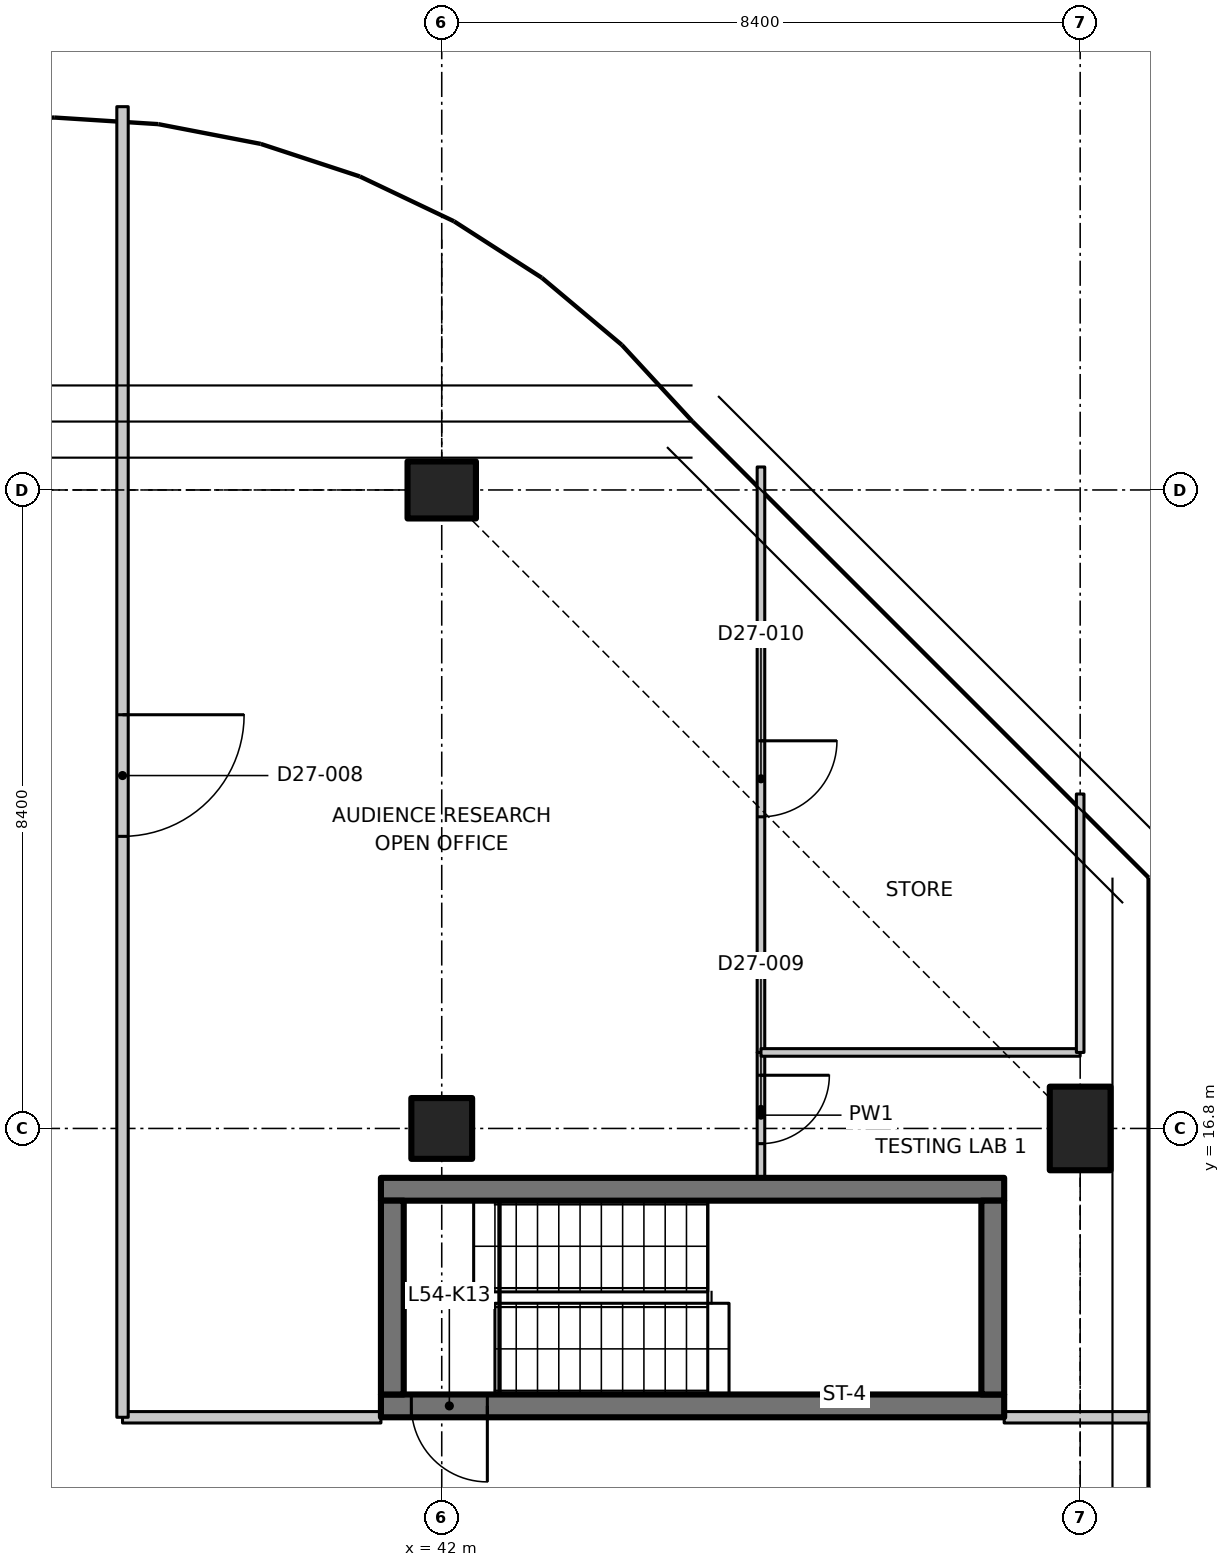
"""IFC4 building model, lengths in metres.
Left out: names, types, materials, properties, quantities, classifications, styles, units other than length and angle.
Written with IfcOpenShell. Run it as: python <this file> out.ifc"""

import sys

from ifc_helpers import new_model, si_unit, direction, frame, frame_2d, origin, origin_2d, place, context, subcontext, project, spatial, polyline, rectangle, outline, extrude, element, fill, save


model = new_model("IFC4")
c1 = context("Model", 3, precision=1e-05, world=origin(), true_north=direction((0.0, 1.0)))
c2 = subcontext(c1, "Body", "Model", "MODEL_VIEW")
j1 = project(units=[si_unit("LENGTHUNIT", "METRE"), si_unit("PLANEANGLEUNIT", "RADIAN")], contexts=[c1])
p1 = place(None, origin())
s1 = spatial("IfcSite", under=j1, at=p1, CompositionType="ELEMENT")
p2 = place(p1, origin())
s2 = spatial("IfcBuilding", under=s1, at=p2, CompositionType="ELEMENT")
p3 = place(p2, frame((0.0, 0.0, 215.7)))
s3 = spatial("IfcBuildingStorey", under=s2, at=p3, CompositionType="ELEMENT", Elevation=215.7)
p4 = place(p3, frame((42.0, 16.8, 0.0), z_axis=(0.0, 0.0, 1.0), x_axis=(1.0, 0.0, 0.0)))
e1 = element("IfcColumn", 1, at=p4, inside=s3, PredefinedType="COLUMN", context=c2, shape_type="SweptSolid", body=[
    extrude(rectangle(XDim=0.8, YDim=0.8, at=origin_2d()), origin(), (0.0, 0.0, 1.0), 3.35),
])
p5 = place(p3, frame((42.0, 25.2, 0.0), z_axis=(0.0, 0.0, 1.0), x_axis=(0.0, 1.0, 0.0)))
e2 = element("IfcColumn", 2, at=p5, inside=s3, PredefinedType="COLUMN", context=c2, shape_type="SweptSolid", body=[
    extrude(rectangle(XDim=0.75, YDim=0.9, at=origin_2d()), origin(), (0.0, 0.0, 1.0), 3.35),
])
p6 = place(p3, frame((50.4, 16.8, 0.0), z_axis=(0.0, 0.0, 1.0), x_axis=(1.0, 0.0, 0.0)))
e3 = element("IfcColumn", 3, at=p6, inside=s3, PredefinedType="COLUMN", context=c2, shape_type="SweptSolid", body=[
    extrude(rectangle(XDim=0.8, YDim=1.1, at=origin_2d()), origin(), (0.0, 0.0, 1.0), 3.35),
])
p7 = place(p3, frame((49.4, 13.15, 0.0), z_axis=(0.0, 0.0, 1.0), x_axis=(-1.0, 0.0, 0.0)))
e4 = element("IfcWall", 4, at=p7, inside=s3, PredefinedType="SHEAR", context=c2, shape_type="SweptSolid", body=[
    extrude(rectangle(XDim=8.2, YDim=0.3, at=frame_2d((4.1, 0.0))), origin(), (0.0, 0.0, 1.0), 3.35),
])
p8 = place(p7, frame((6.8, 0.0, 0.0)))
e5 = element("IfcOpeningElement", 5, at=p8, cuts=e4, PredefinedType="OPENING", context=c2, shape_type="SweptSolid", body=[
    extrude(rectangle(XDim=1.0, YDim=2.1, at=frame_2d((0.5, 1.05))), frame((0.0, 0.16, 0.0), z_axis=(0.0, -1.0, 0.0), x_axis=(1.0, 0.0, 0.0)), (0.0, 0.0, 1.0), 0.32),
])
p9 = place(p3, frame((41.2, 16.0, 0.0), z_axis=(0.0, 0.0, 1.0), x_axis=(1.0, 0.0, 0.0)))
e6 = element("IfcWall", 6, at=p9, inside=s3, PredefinedType="SHEAR", context=c2, shape_type="SweptSolid", body=[
    extrude(rectangle(XDim=8.2, YDim=0.3, at=frame_2d((4.1, 0.0))), origin(), (0.0, 0.0, 1.0), 3.35),
])
for number, where, z_axis, x_axis in (
    (7, (41.35, 13.3, 0.0), (0.0, 0.0, 1.0), (0.0, 1.0, 0.0)),
    (8, (49.25, 13.3, 0.0), (0.0, 0.0, 1.0), (0.0, 1.0, 0.0)),
):
    element("IfcWall", number, at=place(p3, frame(where, z_axis=z_axis, x_axis=x_axis)), inside=s3, PredefinedType="SHEAR", context=c2, shape_type="SweptSolid", body=[
        extrude(rectangle(XDim=2.55, YDim=0.3, at=frame_2d((1.275, 0.0))), origin(), (0.0, 0.0, 1.0), 3.35),
    ])
p10 = place(p3, frame((37.8, 13.0, 0.0), z_axis=(0.0, 0.0, 1.0), x_axis=(1.0, 0.0, 0.0)))
e9 = element("IfcWall", 9, at=p10, inside=s3, PredefinedType="PARTITIONING", context=c2, shape_type="SweptSolid", body=[
    extrude(rectangle(XDim=3.4, YDim=0.15, at=frame_2d((1.7, 0.0))), origin(), (0.0, 0.0, 1.0), 3.33),
])
p11 = place(p3, frame((49.4, 13.0, 0.0), z_axis=(0.0, 0.0, 1.0), x_axis=(1.0, 0.0, 0.0)))
e10 = element("IfcWall", 10, at=p11, inside=s3, PredefinedType="PARTITIONING", context=c2, shape_type="SweptSolid", body=[
    extrude(rectangle(XDim=2.42, YDim=0.15, at=frame_2d((1.21, 0.0))), origin(), (0.0, 0.0, 1.0), 2.98),
])
p12 = place(p3, frame((37.8, 30.243, 0.0), z_axis=(0.0, 0.0, 1.0), x_axis=(0.0, -1.0, 0.0)))
e11 = element("IfcWall", 11, at=p12, inside=s3, PredefinedType="PARTITIONING", context=c2, shape_type="SweptSolid", body=[
    extrude(outline(polyline([(0.0, 0.0), (17.243, 0.0), (17.243, 3.33), (5.493, 3.33), (5.491, 2.98), (4.595, 2.98), (4.593, 3.33), (0.0, 3.33), (0.0, 0.0)])), frame((0.0, 0.075, 0.0), z_axis=(0.0, -1.0, 0.0), x_axis=(1.0, 0.0, 0.0)), (0.0, 0.0, 1.0), 0.15),
])
p13 = place(p12, frame((8.0, 0.0, 0.0)))
e12 = element("IfcOpeningElement", 12, at=p13, cuts=e11, PredefinedType="OPENING", context=c2, shape_type="SweptSolid", body=[
    extrude(rectangle(XDim=1.6, YDim=2.1, at=frame_2d((0.8, 1.05))), frame((0.0, 0.085, 0.0), z_axis=(0.0, -1.0, 0.0), x_axis=(1.0, 0.0, 0.0)), (0.0, 0.0, 1.0), 0.17),
])
p14 = place(p3, frame((46.2, 17.8, 0.0), z_axis=(0.0, 0.0, 1.0), x_axis=(0.0, -1.0, 0.0)))
e13 = element("IfcWall", 13, at=p14, inside=s3, PredefinedType="PARTITIONING", context=c2, shape_type="SweptSolid", body=[
    extrude(rectangle(XDim=1.65, YDim=0.1, at=frame_2d((0.825, 0.0))), origin(), (0.0, 0.0, 1.0), 3.33),
])
p15 = place(p14, frame((0.3, 0.0, 0.0)))
e14 = element("IfcOpeningElement", 14, at=p15, cuts=e13, PredefinedType="OPENING", context=c2, shape_type="SweptSolid", body=[
    extrude(rectangle(XDim=0.9, YDim=2.1, at=frame_2d((0.45, 1.05))), frame((0.0, 0.06, 0.0), z_axis=(0.0, -1.0, 0.0), x_axis=(1.0, 0.0, 0.0)), (0.0, 0.0, 1.0), 0.12),
])
p16 = place(p3, frame((46.2, 25.502, 0.0), z_axis=(0.0, 0.0, 1.0), x_axis=(0.0, -1.0, 0.0)))
e15 = element("IfcWall", 15, at=p16, inside=s3, PredefinedType="PARTITIONING", context=c2, shape_type="SweptSolid", body=[
    extrude(outline(polyline([(0.0, 0.0), (7.702, 0.0), (7.702, 3.33), (5.168, 3.33), (5.166, 2.98), (3.839, 2.98), (3.837, 3.33), (0.103, 3.33), (0.0, 3.33), (0.0, 0.0)])), frame((0.0, 0.05, 0.0), z_axis=(0.0, -1.0, 0.0), x_axis=(1.0, 0.0, 0.0)), (0.0, 0.0, 1.0), 0.1),
])
p17 = place(p16, frame((3.603, 0.0, 0.0)))
e16 = element("IfcOpeningElement", 16, at=p17, cuts=e15, PredefinedType="OPENING", context=c2, shape_type="SweptSolid", body=[
    extrude(rectangle(XDim=1.0, YDim=2.1, at=frame_2d((0.5, 1.05))), frame((0.0, 0.06, 0.0), z_axis=(0.0, -1.0, 0.0), x_axis=(1.0, 0.0, 0.0)), (0.0, 0.0, 1.0), 0.12),
])
p18 = place(p3, frame((46.2, 17.8, 0.0), z_axis=(0.0, 0.0, 1.0), x_axis=(1.0, 0.0, 0.0)))
e17 = element("IfcWall", 17, at=p18, inside=s3, PredefinedType="PARTITIONING", context=c2, shape_type="SweptSolid", body=[
    extrude(rectangle(XDim=4.2, YDim=0.1, at=frame_2d((2.1, 0.0))), origin(), (0.0, 0.0, 1.0), 2.98),
])
p19 = place(p3, frame((50.4, 17.8, 0.0), z_axis=(0.0, 0.0, 1.0), x_axis=(0.0, 1.0, 0.0)))
e18 = element("IfcWall", 18, at=p19, inside=s3, PredefinedType="PARTITIONING", context=c2, shape_type="SweptSolid", body=[
    extrude(rectangle(XDim=3.4, YDim=0.1, at=frame_2d((1.7, 0.0))), origin(), (0.0, 0.0, 1.0), 3.33),
])
p20 = place(p8, origin())
e19 = element("IfcDoor", 19, at=p20, inside=s3, OperationType="SINGLE_SWING_RIGHT", PredefinedType="DOOR", context=c2, shape_type="SweptSolid", body=[
    extrude(rectangle(XDim=1.0, YDim=2.1, at=frame_2d((0.5, 1.05))), frame((0.0, 0.025, 0.0), z_axis=(0.0, -1.0, 0.0), x_axis=(1.0, 0.0, 0.0)), (0.0, 0.0, 1.0), 0.05),
])
fill(e5, e19)
p21 = place(p13, origin())
e20 = element("IfcDoor", 20, at=p21, inside=s3, OperationType="DOUBLE_DOOR_SINGLE_SWING", PredefinedType="DOOR", context=c2, shape_type="SweptSolid", body=[
    extrude(rectangle(XDim=1.6, YDim=2.1, at=frame_2d((0.8, 1.05))), frame((0.0, 0.025, 0.0), z_axis=(0.0, -1.0, 0.0), x_axis=(1.0, 0.0, 0.0)), (0.0, 0.0, 1.0), 0.05),
])
fill(e12, e20)
p22 = place(p15, origin())
e21 = element("IfcDoor", 21, at=p22, inside=s3, OperationType="SINGLE_SWING_LEFT", PredefinedType="DOOR", context=c2, shape_type="SweptSolid", body=[
    extrude(rectangle(XDim=0.9, YDim=2.1, at=frame_2d((0.45, 1.05))), frame((0.0, 0.025, 0.0), z_axis=(0.0, -1.0, 0.0), x_axis=(1.0, 0.0, 0.0)), (0.0, 0.0, 1.0), 0.05),
])
fill(e14, e21)
p23 = place(p17, origin())
e22 = element("IfcDoor", 22, at=p23, inside=s3, OperationType="SINGLE_SWING_LEFT", PredefinedType="DOOR", context=c2, shape_type="SweptSolid", body=[
    extrude(rectangle(XDim=1.0, YDim=2.1, at=frame_2d((0.5, 1.05))), frame((0.0, 0.025, 0.0), z_axis=(0.0, -1.0, 0.0), x_axis=(1.0, 0.0, 0.0)), (0.0, 0.0, 1.0), 0.05),
])
fill(e16, e22)
save(model, sys.argv[1])
